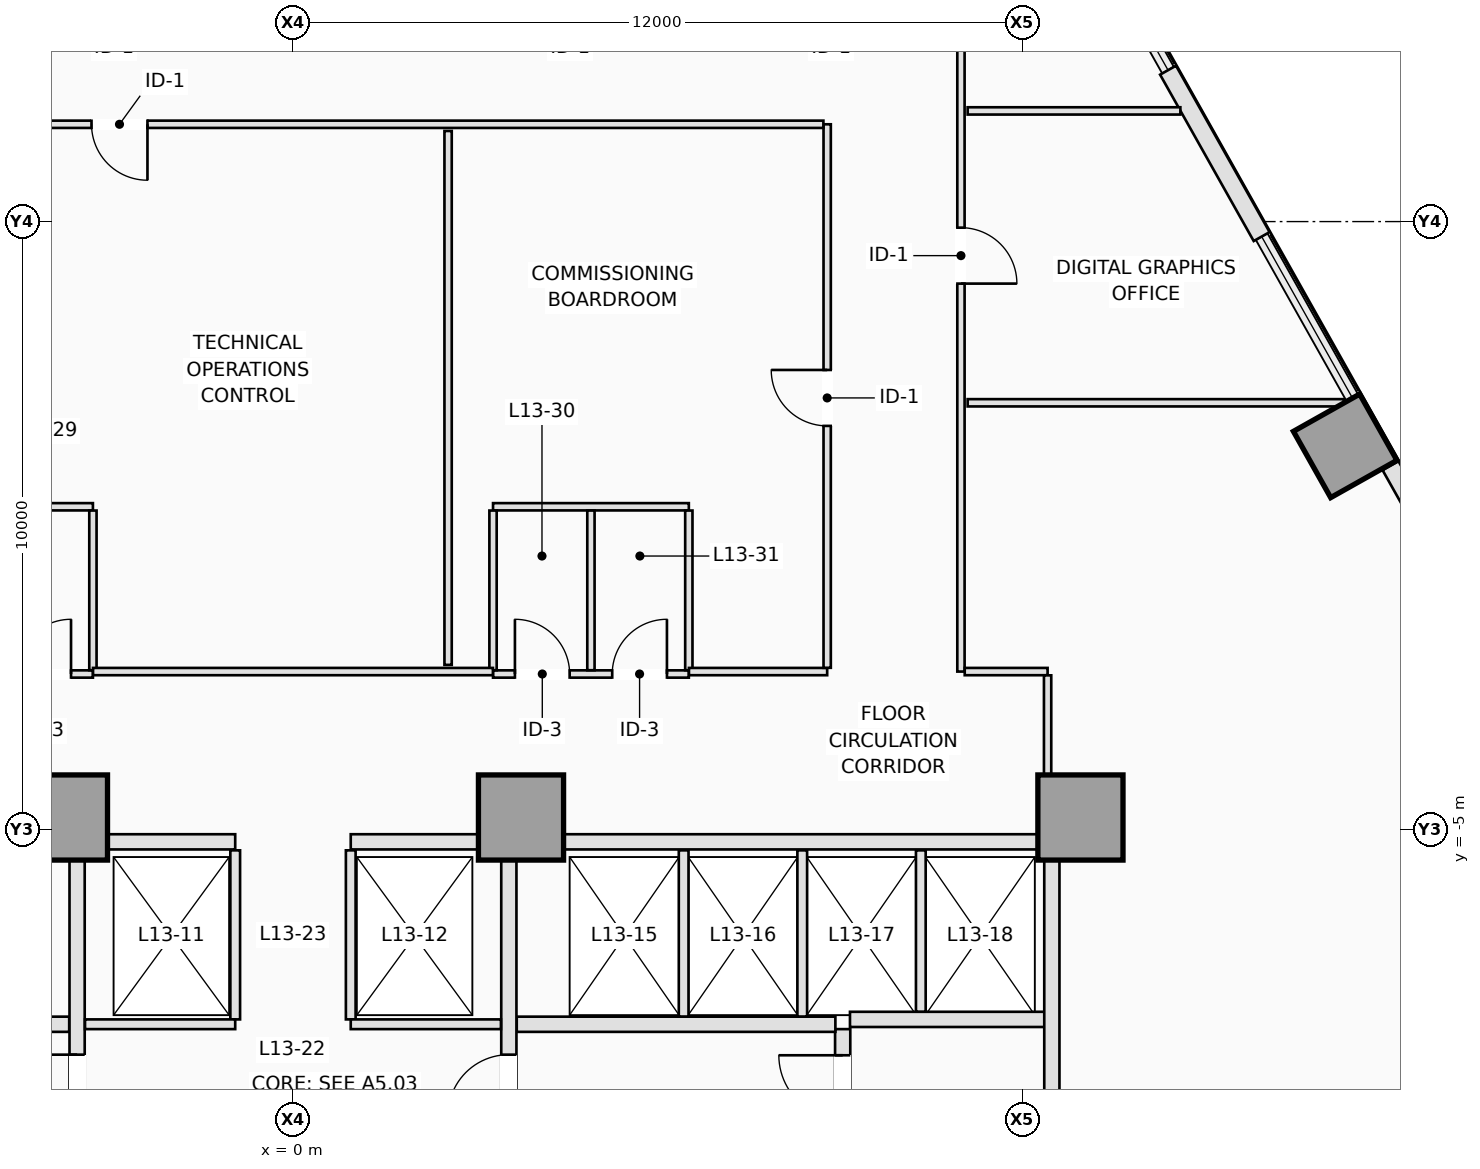
"""IFC4 building model, lengths in metres.
Left out: names, types, materials, properties, quantities, classifications, styles, units other than length and angle.
Written with IfcOpenShell. Run it as: python <this file> out.ifc"""

import sys

from ifc_helpers import new_model, si_unit, direction, frame, frame_2d, origin, origin_2d, place, context, subcontext, project, spatial, rectangle, extrude, element, fill, save


model = new_model("IFC4")
c1 = context("Model", 3, precision=1e-05, world=origin(), true_north=direction((0.0, 1.0)))
c2 = subcontext(c1, "Body", "Model", "MODEL_VIEW")
j1 = project(units=[si_unit("LENGTHUNIT", "METRE"), si_unit("PLANEANGLEUNIT", "RADIAN")], contexts=[c1])
p1 = place(None, origin())
s1 = spatial("IfcSite", under=j1, at=p1, CompositionType="ELEMENT")
p2 = place(p1, origin())
s2 = spatial("IfcBuilding", under=s1, at=p2, CompositionType="ELEMENT")
p3 = place(p2, frame((0.0, 0.0, 52.1)))
s3 = spatial("IfcBuildingStorey", under=s2, at=p3, CompositionType="ELEMENT", Elevation=52.1)
for number, where, z_axis, x_axis in (
    (1, (-3.75, -4.8, 0.0), (0.0, 0.0, 1.0), (1.0, 0.0, 0.0)),
    (2, (3.75, -4.8, 0.0), (0.0, 0.0, 1.0), (1.0, 0.0, 0.0)),
    (3, (12.95, -4.8, 0.0), (0.0, 0.0, 1.0), (1.0, 0.0, 0.0)),
):
    element("IfcColumn", number, at=place(p3, frame(where, z_axis=z_axis, x_axis=x_axis)), inside=s3, PredefinedType="COLUMN", context=c2, shape_type="SweptSolid", body=[
        extrude(rectangle(XDim=1.4, YDim=1.4, at=origin_2d()), origin(), (0.0, 0.0, 1.0), 3.5),
    ])
p4 = place(p3, frame((17.304, 1.312, 0.0), z_axis=(0.0, 0.0, 1.0), x_axis=(0.871575139605, 0.490261946333, 0.0)))
e4 = element("IfcColumn", 4, at=p4, inside=s3, PredefinedType="COLUMN", context=c2, shape_type="SweptSolid", body=[
    extrude(rectangle(XDim=1.25, YDim=1.25, at=origin_2d()), origin(), (0.0, 0.0, 1.0), 3.5),
])
p5 = place(p3, frame((18.05, 0.986, 0.0), z_axis=(0.0, 0.0, 1.0), x_axis=(0.490277063651, -0.871566635925, 0.0)))
e5 = element("IfcWall", 5, at=p5, inside=s3, PredefinedType="STANDARD", context=c2, shape_type="SweptSolid", body=[
    extrude(rectangle(XDim=2.198, YDim=0.3, at=frame_2d((1.099, 0.0))), origin(), (0.0, 0.0, 1.0), 3.25),
])
p6 = place(p3, frame((14.391, 7.49, 0.0), z_axis=(0.0, 0.0, 1.0), x_axis=(0.490290775148, -0.871558922738, 0.0)))
e6 = element("IfcWall", 6, at=p6, inside=s3, PredefinedType="STANDARD", context=c2, shape_type="SweptSolid", body=[
    extrude(rectangle(XDim=3.14, YDim=0.3, at=frame_2d((1.57, 0.0))), origin(), (0.0, 0.0, 1.0), 3.25),
])
p7 = place(p3, frame((17.067, -20.796, 0.0), z_axis=(0.0, 0.0, 1.0), x_axis=(0.490268135177, 0.871571658345, 0.0)))
e7 = element("IfcWall", 7, at=p7, inside=s3, PredefinedType="STANDARD", context=c2, shape_type="SweptSolid", body=[
    extrude(rectangle(XDim=13.448, YDim=0.24, at=frame_2d((6.724, 0.0))), origin(), (0.0, 0.0, 1.0), 3.25),
])
p8 = place(p7, frame((5.824, 0.0, 0.9)))
e8 = element("IfcOpeningElement", 8, at=p8, cuts=e7, PredefinedType="OPENING", context=c2, shape_type="SweptSolid", body=[
    extrude(rectangle(XDim=1.8, YDim=2.1, at=frame_2d((0.9, 1.05))), frame((0.0, 0.13, 0.0), z_axis=(0.0, -1.0, 0.0), x_axis=(1.0, 0.0, 0.0)), (0.0, 0.0, 1.0), 0.26),
])
p9 = place(p3, frame((9.04, -10.18, 0.0), z_axis=(0.0, 0.0, 1.0), x_axis=(0.0, 1.0, 0.0)))
e9 = element("IfcWall", 9, at=p9, inside=s3, PredefinedType="PARTITIONING", context=c2, shape_type="SweptSolid", body=[
    extrude(rectangle(XDim=1.9, YDim=0.25, at=frame_2d((0.95, 0.0))), origin(), (0.0, 0.0, 1.0), 3.25),
])
p10 = place(p9, frame((0.42, 0.0, 0.0)))
e10 = element("IfcOpeningElement", 10, at=p10, cuts=e9, PredefinedType="OPENING", context=c2, shape_type="SweptSolid", body=[
    extrude(rectangle(XDim=1.05, YDim=2.15, at=frame_2d((0.525, 1.075))), frame((0.0, 0.135, 0.0), z_axis=(0.0, -1.0, 0.0), x_axis=(1.0, 0.0, 0.0)), (0.0, 0.0, 1.0), 0.27),
])
p11 = place(p3, frame((9.16, -8.12, 0.0), z_axis=(0.0, 0.0, 1.0), x_axis=(1.0, 0.0, 0.0)))
e11 = element("IfcWall", 11, at=p11, inside=s3, PredefinedType="PARTITIONING", context=c2, shape_type="SweptSolid", body=[
    extrude(rectangle(XDim=3.22, YDim=0.25, at=frame_2d((1.61, 0.0))), origin(), (0.0, 0.0, 1.0), 3.25),
])
p12 = place(p3, frame((12.48, -10.18, 0.0), z_axis=(0.0, 0.0, 1.0), x_axis=(0.0, 1.0, 0.0)))
e12 = element("IfcWall", 12, at=p12, inside=s3, PredefinedType="PARTITIONING", context=c2, shape_type="SweptSolid", body=[
    extrude(rectangle(XDim=4.678, YDim=0.25, at=frame_2d((2.339, 0.0))), origin(), (0.0, 0.0, 1.0), 3.25),
])
for number, where, z_axis, x_axis in (
    (13, (-8.92, -8.2, 0.0), (0.0, 0.0, 1.0), (1.0, 0.0, 0.0)),
    (14, (3.68, -8.2, 0.0), (0.0, 0.0, 1.0), (1.0, 0.0, 0.0)),
):
    element("IfcWall", number, at=place(p3, frame(where, z_axis=z_axis, x_axis=x_axis)), inside=s3, PredefinedType="PARTITIONING", context=c2, shape_type="SweptSolid", body=[
        extrude(rectangle(XDim=5.24, YDim=0.25, at=frame_2d((2.62, 0.0))), origin(), (0.0, 0.0, 1.0), 3.25),
    ])
p13 = place(p3, frame((-3.55, -15.648, 0.0), z_axis=(0.0, 0.0, 1.0), x_axis=(0.0, 1.0, 0.0)))
e15 = element("IfcWall", 15, at=p13, inside=s3, PredefinedType="PARTITIONING", context=c2, shape_type="SweptSolid", body=[
    extrude(rectangle(XDim=10.146, YDim=0.25, at=frame_2d((5.073, 0.0))), origin(), (0.0, 0.0, 1.0), 3.25),
])
p14 = place(p13, frame((5.948, 0.0, 0.0)))
e16 = element("IfcOpeningElement", 16, at=p14, cuts=e15, PredefinedType="OPENING", context=c2, shape_type="SweptSolid", body=[
    extrude(rectangle(XDim=1.0, YDim=2.15, at=frame_2d((0.5, 1.075))), frame((0.0, 0.135, 0.0), z_axis=(0.0, -1.0, 0.0), x_axis=(1.0, 0.0, 0.0)), (0.0, 0.0, 1.0), 0.27),
])
p15 = place(p3, frame((3.55, -15.648, 0.0), z_axis=(0.0, 0.0, 1.0), x_axis=(0.0, 1.0, 0.0)))
e17 = element("IfcWall", 17, at=p15, inside=s3, PredefinedType="PARTITIONING", context=c2, shape_type="SweptSolid", body=[
    extrude(rectangle(XDim=10.146, YDim=0.25, at=frame_2d((5.073, 0.0))), origin(), (0.0, 0.0, 1.0), 3.25),
])
p16 = place(p15, frame((5.948, 0.0, 0.0)))
e18 = element("IfcOpeningElement", 18, at=p16, cuts=e17, PredefinedType="OPENING", context=c2, shape_type="SweptSolid", body=[
    extrude(rectangle(XDim=1.0, YDim=2.15, at=frame_2d((0.5, 1.075))), frame((0.0, 0.135, 0.0), z_axis=(0.0, -1.0, 0.0), x_axis=(1.0, 0.0, 0.0)), (0.0, 0.0, 1.0), 0.27),
])
p17 = place(p3, frame((4.452, -5.2, 0.0), z_axis=(0.0, 0.0, 1.0), x_axis=(1.0, 0.0, 0.0)))
e19 = element("IfcWall", 19, at=p17, inside=s3, PredefinedType="PARTITIONING", context=c2, shape_type="SweptSolid", body=[
    extrude(rectangle(XDim=7.796, YDim=0.25, at=frame_2d((3.898, 0.0))), origin(), (0.0, 0.0, 1.0), 3.25),
])
for number, where, z_axis, x_axis in (
    (20, (-3.048, -5.2, 0.0), (0.0, 0.0, 1.0), (1.0, 0.0, 0.0)),
    (21, (0.95, -5.2, 0.0), (0.0, 0.0, 1.0), (1.0, 0.0, 0.0)),
):
    element("IfcWall", number, at=place(p3, frame(where, z_axis=z_axis, x_axis=x_axis)), inside=s3, PredefinedType="PARTITIONING", context=c2, shape_type="SweptSolid", body=[
        extrude(rectangle(XDim=2.098, YDim=0.25, at=frame_2d((1.049, 0.0))), origin(), (0.0, 0.0, 1.0), 3.25),
    ])
for number, where, z_axis, x_axis in (
    (22, (6.425, -8.073, 0.0), (0.0, 0.0, 1.0), (0.0, 1.0, 0.0)),
    (23, (8.375, -8.073, 0.0), (0.0, 0.0, 1.0), (0.0, 1.0, 0.0)),
):
    element("IfcWall", number, at=place(p3, frame(where, z_axis=z_axis, x_axis=x_axis)), inside=s3, PredefinedType="PARTITIONING", context=c2, shape_type="SweptSolid", body=[
        extrude(rectangle(XDim=2.733, YDim=0.16, at=frame_2d((1.366, 0.0))), origin(), (0.0, 0.0, 1.0), 3.25),
    ])
p18 = place(p3, frame((10.325, -7.993, 0.0), z_axis=(0.0, 0.0, 1.0), x_axis=(0.0, 1.0, 0.0)))
e24 = element("IfcWall", 24, at=p18, inside=s3, PredefinedType="PARTITIONING", context=c2, shape_type="SweptSolid", body=[
    extrude(rectangle(XDim=2.653, YDim=0.16, at=frame_2d((1.326, 0.0))), origin(), (0.0, 0.0, 1.0), 3.25),
])
for number, where, z_axis, x_axis in (
    (25, (-0.95, -8.12, 0.0), (0.0, 0.0, 1.0), (0.0, 1.0, 0.0)),
    (26, (0.95, -8.12, 0.0), (0.0, 0.0, 1.0), (0.0, 1.0, 0.0)),
):
    element("IfcWall", number, at=place(p3, frame(where, z_axis=z_axis, x_axis=x_axis)), inside=s3, PredefinedType="PARTITIONING", context=c2, shape_type="SweptSolid", body=[
        extrude(rectangle(XDim=2.78, YDim=0.16, at=frame_2d((1.39, 0.0))), origin(), (0.0, 0.0, 1.0), 3.25),
    ])
for number, where, z_axis, x_axis in (
    (27, (-3.42, -8.2, 0.0), (0.0, 0.0, 1.0), (1.0, 0.0, 0.0)),
    (28, (0.95, -8.2, 0.0), (0.0, 0.0, 1.0), (1.0, 0.0, 0.0)),
):
    element("IfcWall", number, at=place(p3, frame(where, z_axis=z_axis, x_axis=x_axis)), inside=s3, PredefinedType="PARTITIONING", context=c2, shape_type="SweptSolid", body=[
        extrude(rectangle(XDim=2.47, YDim=0.16, at=frame_2d((1.235, 0.0))), origin(), (0.0, 0.0, 1.0), 3.25),
    ])
p19 = place(p3, frame((-6.51, -2.44, 0.0), z_axis=(0.0, 0.0, 1.0), x_axis=(1.0, 0.0, 0.0)))
e29 = element("IfcWall", 29, at=p19, inside=s3, PredefinedType="PARTITIONING", context=c2, shape_type="SweptSolid", body=[
    extrude(rectangle(XDim=3.22, YDim=0.12, at=frame_2d((1.61, 0.0))), origin(), (0.0, 0.0, 1.0), 3.25),
])
p20 = place(p19, frame((0.36, 0.0, 0.0)))
e30 = element("IfcOpeningElement", 30, at=p20, cuts=e29, PredefinedType="OPENING", context=c2, shape_type="SweptSolid", body=[
    extrude(rectangle(XDim=0.9, YDim=2.12, at=frame_2d((0.45, 1.06))), frame((0.0, 0.07, 0.0), z_axis=(0.0, -1.0, 0.0), x_axis=(1.0, 0.0, 0.0)), (0.0, 0.0, 1.0), 0.14),
])
p21 = place(p19, frame((1.96, 0.0, 0.0)))
e31 = element("IfcOpeningElement", 31, at=p21, cuts=e29, PredefinedType="OPENING", context=c2, shape_type="SweptSolid", body=[
    extrude(rectangle(XDim=0.9, YDim=2.12, at=frame_2d((0.45, 1.06))), frame((0.0, 0.07, 0.0), z_axis=(0.0, -1.0, 0.0), x_axis=(1.0, 0.0, 0.0)), (0.0, 0.0, 1.0), 0.14),
])
p22 = place(p3, frame((-6.51, 0.31, 0.0), z_axis=(0.0, 0.0, 1.0), x_axis=(1.0, 0.0, 0.0)))
e32 = element("IfcWall", 32, at=p22, inside=s3, PredefinedType="PARTITIONING", context=c2, shape_type="SweptSolid", body=[
    extrude(rectangle(XDim=3.22, YDim=0.12, at=frame_2d((1.61, 0.0))), origin(), (0.0, 0.0, 1.0), 2.844),
])
p23 = place(p3, frame((-3.29, -2.378, 0.0), z_axis=(0.0, 0.0, 1.0), x_axis=(0.0, 1.0, 0.0)))
e33 = element("IfcWall", 33, at=p23, inside=s3, PredefinedType="PARTITIONING", context=c2, shape_type="SweptSolid", body=[
    extrude(rectangle(XDim=2.626, YDim=0.12, at=frame_2d((1.313, 0.0))), origin(), (0.0, 0.0, 1.0), 3.25),
])
p24 = place(p3, frame((3.29, -2.44, 0.0), z_axis=(0.0, 0.0, 1.0), x_axis=(1.0, 0.0, 0.0)))
e34 = element("IfcWall", 34, at=p24, inside=s3, PredefinedType="PARTITIONING", context=c2, shape_type="SweptSolid", body=[
    extrude(rectangle(XDim=3.22, YDim=0.12, at=frame_2d((1.61, 0.0))), origin(), (0.0, 0.0, 1.0), 3.25),
])
p25 = place(p24, frame((0.36, 0.0, 0.0)))
e35 = element("IfcOpeningElement", 35, at=p25, cuts=e34, PredefinedType="OPENING", context=c2, shape_type="SweptSolid", body=[
    extrude(rectangle(XDim=0.9, YDim=2.12, at=frame_2d((0.45, 1.06))), frame((0.0, 0.07, 0.0), z_axis=(0.0, -1.0, 0.0), x_axis=(1.0, 0.0, 0.0)), (0.0, 0.0, 1.0), 0.14),
])
p26 = place(p24, frame((1.96, 0.0, 0.0)))
e36 = element("IfcOpeningElement", 36, at=p26, cuts=e34, PredefinedType="OPENING", context=c2, shape_type="SweptSolid", body=[
    extrude(rectangle(XDim=0.9, YDim=2.12, at=frame_2d((0.45, 1.06))), frame((0.0, 0.07, 0.0), z_axis=(0.0, -1.0, 0.0), x_axis=(1.0, 0.0, 0.0)), (0.0, 0.0, 1.0), 0.14),
])
p27 = place(p3, frame((3.29, 0.31, 0.0), z_axis=(0.0, 0.0, 1.0), x_axis=(1.0, 0.0, 0.0)))
e37 = element("IfcWall", 37, at=p27, inside=s3, PredefinedType="PARTITIONING", context=c2, shape_type="SweptSolid", body=[
    extrude(rectangle(XDim=3.22, YDim=0.12, at=frame_2d((1.61, 0.0))), origin(), (0.0, 0.0, 1.0), 2.844),
])
for number, where, z_axis, x_axis in (
    (38, (3.29, -2.378, 0.0), (0.0, 0.0, 1.0), (0.0, 1.0, 0.0)),
    (39, (4.9, -2.378, 0.0), (0.0, 0.0, 1.0), (0.0, 1.0, 0.0)),
    (40, (6.51, -2.378, 0.0), (0.0, 0.0, 1.0), (0.0, 1.0, 0.0)),
):
    element("IfcWall", number, at=place(p3, frame(where, z_axis=z_axis, x_axis=x_axis)), inside=s3, PredefinedType="PARTITIONING", context=c2, shape_type="SweptSolid", body=[
        extrude(rectangle(XDim=2.626, YDim=0.12, at=frame_2d((1.313, 0.0))), origin(), (0.0, 0.0, 1.0), 3.25),
    ])
p28 = place(p3, frame((10.985, 8.738, 0.0), z_axis=(0.0, 0.0, 1.0), x_axis=(0.0, -1.0, 0.0)))
e41 = element("IfcWall", 41, at=p28, inside=s3, PredefinedType="PARTITIONING", context=c2, shape_type="SweptSolid", body=[
    extrude(rectangle(XDim=11.138, YDim=0.12, at=frame_2d((5.569, 0.0))), origin(), (0.0, 0.0, 1.0), 3.25),
])
p29 = place(p28, frame((3.838, 0.0, 0.0)))
e42 = element("IfcOpeningElement", 42, at=p29, cuts=e41, PredefinedType="OPENING", context=c2, shape_type="SweptSolid", body=[
    extrude(rectangle(XDim=0.92, YDim=2.12, at=frame_2d((0.46, 1.06))), frame((0.0, 0.07, 0.0), z_axis=(0.0, -1.0, 0.0), x_axis=(1.0, 0.0, 0.0)), (0.0, 0.0, 1.0), 0.14),
])
p30 = place(p3, frame((11.047, -2.4, 0.0), z_axis=(0.0, 0.0, 1.0), x_axis=(1.0, 0.0, 0.0)))
e43 = element("IfcWall", 43, at=p30, inside=s3, PredefinedType="PARTITIONING", context=c2, shape_type="SweptSolid", body=[
    extrude(rectangle(XDim=1.363, YDim=0.12, at=frame_2d((0.681, 0.0))), origin(), (0.0, 0.0, 1.0), 3.25),
])
p31 = place(p3, frame((12.41, -2.462, 0.0), z_axis=(0.0, 0.0, 1.0), x_axis=(0.0, -1.0, 0.0)))
e44 = element("IfcWall", 44, at=p31, inside=s3, PredefinedType="PARTITIONING", context=c2, shape_type="SweptSolid", body=[
    extrude(rectangle(XDim=1.636, YDim=0.12, at=frame_2d((0.818, 0.0))), origin(), (0.0, 0.0, 1.0), 3.25),
])
p32 = place(p3, frame((-3.288, -2.4, 0.0), z_axis=(0.0, 0.0, 1.0), x_axis=(1.0, 0.0, 0.0)))
e45 = element("IfcWall", 45, at=p32, inside=s3, PredefinedType="PARTITIONING", context=c2, shape_type="SweptSolid", body=[
    extrude(rectangle(XDim=6.576, YDim=0.12, at=frame_2d((3.288, 0.0))), origin(), (0.0, 0.0, 1.0), 3.25),
])
p33 = place(p3, frame((6.512, -2.4, 0.0), z_axis=(0.0, 0.0, 1.0), x_axis=(1.0, 0.0, 0.0)))
e46 = element("IfcWall", 46, at=p33, inside=s3, PredefinedType="PARTITIONING", context=c2, shape_type="SweptSolid", body=[
    extrude(rectangle(XDim=2.273, YDim=0.12, at=frame_2d((1.136, 0.0))), origin(), (0.0, 0.0, 1.0), 3.25),
])
p34 = place(p3, frame((8.785, -2.338, 0.0), z_axis=(0.0, 0.0, 1.0), x_axis=(0.0, 1.0, 0.0)))
e47 = element("IfcWall", 47, at=p34, inside=s3, PredefinedType="PARTITIONING", context=c2, shape_type="SweptSolid", body=[
    extrude(rectangle(XDim=8.938, YDim=0.12, at=frame_2d((4.469, 0.0))), origin(), (0.0, 0.0, 1.0), 3.25),
])
p35 = place(p34, frame((3.978, 0.0, 0.0)))
e48 = element("IfcOpeningElement", 48, at=p35, cuts=e47, PredefinedType="OPENING", context=c2, shape_type="SweptSolid", body=[
    extrude(rectangle(XDim=0.92, YDim=2.12, at=frame_2d((0.46, 1.06))), frame((0.0, 0.07, 0.0), z_axis=(0.0, -1.0, 0.0), x_axis=(1.0, 0.0, 0.0)), (0.0, 0.0, 1.0), 0.14),
])
p36 = place(p3, frame((8.723, 6.6, 0.0), z_axis=(0.0, 0.0, 1.0), x_axis=(-1.0, 0.0, 0.0)))
e49 = element("IfcWall", 49, at=p36, inside=s3, PredefinedType="PARTITIONING", context=c2, shape_type="SweptSolid", body=[
    extrude(rectangle(XDim=17.238, YDim=0.12, at=frame_2d((8.619, 0.0))), origin(), (0.0, 0.0, 1.0), 3.25),
])
p37 = place(p36, frame((11.116, 0.0, 0.0)))
e50 = element("IfcOpeningElement", 50, at=p37, cuts=e49, PredefinedType="OPENING", context=c2, shape_type="SweptSolid", body=[
    extrude(rectangle(XDim=0.92, YDim=2.12, at=frame_2d((0.46, 1.06))), frame((0.0, 0.07, 0.0), z_axis=(0.0, -1.0, 0.0), x_axis=(1.0, 0.0, 0.0)), (0.0, 0.0, 1.0), 0.14),
])
p38 = place(p3, frame((14.593, 6.82, 0.0), z_axis=(0.0, 0.0, 1.0), x_axis=(-1.0, 0.0, 0.0)))
e51 = element("IfcWall", 51, at=p38, inside=s3, PredefinedType="PARTITIONING", context=c2, shape_type="SweptSolid", body=[
    extrude(rectangle(XDim=3.498, YDim=0.12, at=frame_2d((1.749, 0.0))), origin(), (0.0, 0.0, 1.0), 3.25),
])
p39 = place(p3, frame((17.284, 2.02, 0.0), z_axis=(0.0, 0.0, 1.0), x_axis=(-1.0, 0.0, 0.0)))
e52 = element("IfcWall", 52, at=p39, inside=s3, PredefinedType="PARTITIONING", context=c2, shape_type="SweptSolid", body=[
    extrude(rectangle(XDim=6.189, YDim=0.12, at=frame_2d((3.095, 0.0))), origin(), (0.0, 0.0, 1.0), 3.25),
])
p40 = place(p3, frame((2.551, -2.29, 0.0), z_axis=(0.0, 0.0, 1.0), x_axis=(0.0, 1.0, 0.0)))
e53 = element("IfcWall", 53, at=p40, inside=s3, PredefinedType="PARTITIONING", context=c2, shape_type="SweptSolid", body=[
    extrude(rectangle(XDim=8.78, YDim=0.12, at=frame_2d((4.39, 0.0))), origin(), (0.0, 0.0, 1.0), 3.25),
])
p41 = place(p10, origin())
e54 = element("IfcDoor", 54, at=p41, inside=s3, OperationType="SINGLE_SWING_RIGHT", PredefinedType="DOOR", context=c2, shape_type="SweptSolid", body=[
    extrude(rectangle(XDim=1.05, YDim=2.15, at=frame_2d((0.525, 1.075))), frame((0.0, 0.025, 0.0), z_axis=(0.0, -1.0, 0.0), x_axis=(1.0, 0.0, 0.0)), (0.0, 0.0, 1.0), 0.05),
])
fill(e10, e54)
p42 = place(p14, origin())
e55 = element("IfcDoor", 55, at=p42, inside=s3, OperationType="SINGLE_SWING_RIGHT", PredefinedType="DOOR", context=c2, shape_type="SweptSolid", body=[
    extrude(rectangle(XDim=1.0, YDim=2.15, at=frame_2d((0.5, 1.075))), frame((0.0, 0.025, 0.0), z_axis=(0.0, -1.0, 0.0), x_axis=(1.0, 0.0, 0.0)), (0.0, 0.0, 1.0), 0.05),
])
fill(e16, e55)
p43 = place(p16, origin())
e56 = element("IfcDoor", 56, at=p43, inside=s3, OperationType="SINGLE_SWING_LEFT", PredefinedType="DOOR", context=c2, shape_type="SweptSolid", body=[
    extrude(rectangle(XDim=1.0, YDim=2.15, at=frame_2d((0.5, 1.075))), frame((0.0, 0.025, 0.0), z_axis=(0.0, -1.0, 0.0), x_axis=(1.0, 0.0, 0.0)), (0.0, 0.0, 1.0), 0.05),
])
fill(e18, e56)
p44 = place(p21, origin())
e57 = element("IfcDoor", 57, at=p44, inside=s3, OperationType="SINGLE_SWING_RIGHT", PredefinedType="DOOR", context=c2, shape_type="SweptSolid", body=[
    extrude(rectangle(XDim=0.9, YDim=2.12, at=frame_2d((0.45, 1.06))), frame((0.0, 0.025, 0.0), z_axis=(0.0, -1.0, 0.0), x_axis=(1.0, 0.0, 0.0)), (0.0, 0.0, 1.0), 0.05),
])
fill(e31, e57)
p45 = place(p25, origin())
e58 = element("IfcDoor", 58, at=p45, inside=s3, OperationType="SINGLE_SWING_LEFT", PredefinedType="DOOR", context=c2, shape_type="SweptSolid", body=[
    extrude(rectangle(XDim=0.9, YDim=2.12, at=frame_2d((0.45, 1.06))), frame((0.0, 0.025, 0.0), z_axis=(0.0, -1.0, 0.0), x_axis=(1.0, 0.0, 0.0)), (0.0, 0.0, 1.0), 0.05),
])
fill(e35, e58)
p46 = place(p26, origin())
e59 = element("IfcDoor", 59, at=p46, inside=s3, OperationType="SINGLE_SWING_RIGHT", PredefinedType="DOOR", context=c2, shape_type="SweptSolid", body=[
    extrude(rectangle(XDim=0.9, YDim=2.12, at=frame_2d((0.45, 1.06))), frame((0.0, 0.025, 0.0), z_axis=(0.0, -1.0, 0.0), x_axis=(1.0, 0.0, 0.0)), (0.0, 0.0, 1.0), 0.05),
])
fill(e36, e59)
p47 = place(p29, origin())
e60 = element("IfcDoor", 60, at=p47, inside=s3, OperationType="SINGLE_SWING_RIGHT", PredefinedType="DOOR", context=c2, shape_type="SweptSolid", body=[
    extrude(rectangle(XDim=0.92, YDim=2.12, at=frame_2d((0.46, 1.06))), frame((0.0, 0.025, 0.0), z_axis=(0.0, -1.0, 0.0), x_axis=(1.0, 0.0, 0.0)), (0.0, 0.0, 1.0), 0.05),
])
fill(e42, e60)
p48 = place(p35, origin())
e61 = element("IfcDoor", 61, at=p48, inside=s3, OperationType="SINGLE_SWING_RIGHT", PredefinedType="DOOR", context=c2, shape_type="SweptSolid", body=[
    extrude(rectangle(XDim=0.92, YDim=2.12, at=frame_2d((0.46, 1.06))), frame((0.0, 0.025, 0.0), z_axis=(0.0, -1.0, 0.0), x_axis=(1.0, 0.0, 0.0)), (0.0, 0.0, 1.0), 0.05),
])
fill(e48, e61)
p49 = place(p37, origin())
e62 = element("IfcDoor", 62, at=p49, inside=s3, OperationType="SINGLE_SWING_LEFT", PredefinedType="DOOR", context=c2, shape_type="SweptSolid", body=[
    extrude(rectangle(XDim=0.92, YDim=2.12, at=frame_2d((0.46, 1.06))), frame((0.0, 0.025, 0.0), z_axis=(0.0, -1.0, 0.0), x_axis=(1.0, 0.0, 0.0)), (0.0, 0.0, 1.0), 0.05),
])
fill(e50, e62)
save(model, sys.argv[1])
